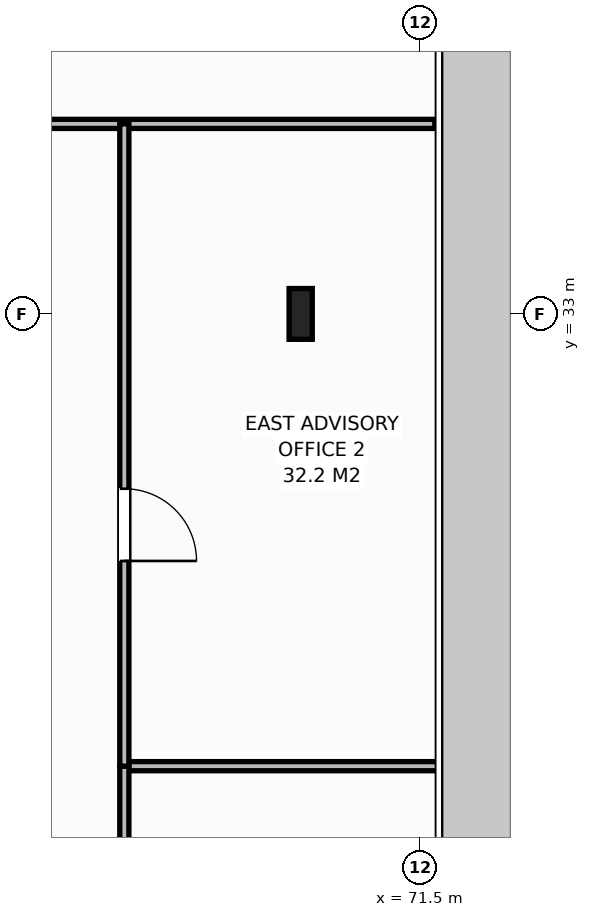
"""IFC4 building model, lengths in metres.
Left out: names, types, materials, properties, quantities, classifications, styles, units other than length and angle.
Written with IfcOpenShell. Run it as: python <this file> out.ifc"""

import sys

from ifc_helpers import new_model, si_unit, direction, frame, frame_2d, origin, origin_2d, place, context, subcontext, project, spatial, rectangle, i_section, extrude, element, fill, save


model = new_model("IFC4")
c1 = context("Model", 3, precision=1e-05, world=origin(), true_north=direction((0.0, 1.0)))
c2 = subcontext(c1, "Body", "Model", "MODEL_VIEW")
j1 = project(units=[si_unit("LENGTHUNIT", "METRE"), si_unit("PLANEANGLEUNIT", "RADIAN")], contexts=[c1])
p1 = place(None, origin())
s1 = spatial("IfcSite", under=j1, at=p1, CompositionType="ELEMENT")
p2 = place(p1, origin())
s2 = spatial("IfcBuilding", under=s1, at=p2, CompositionType="ELEMENT")
p3 = place(p2, frame((0.0, 0.0, 274.6)))
s3 = spatial("IfcBuildingStorey", under=s2, at=p3, CompositionType="ELEMENT", Elevation=274.6)
p4 = place(p3, frame((69.92, 33.0, 0.0), z_axis=(0.0, 0.0, 1.0), x_axis=(1.0, 0.0, 0.0)))
e1 = element("IfcColumn", 1, at=p4, inside=s3, PredefinedType="COLUMN", context=c2, shape_type="SweptSolid", body=[
    extrude(i_section(OverallWidth=0.305, OverallDepth=0.668, WebThickness=0.021, FlangeThickness=0.04, at=origin_2d()), origin(), (0.0, 0.0, 1.0), 3.8),
])
p5 = place(p3, frame((62.016, 35.5, 0.0), z_axis=(0.0, 0.0, 1.0), x_axis=(1.0, 0.0, 0.0)))
e2 = element("IfcWall", 2, at=p5, inside=s3, PredefinedType="PARTITIONING", context=c2, shape_type="SweptSolid", body=[
    extrude(rectangle(XDim=9.669, YDim=0.12, at=frame_2d((4.834, 0.0))), origin(), (0.0, 0.0, 1.0), 3.588),
])
p6 = place(p5, frame((0.48, 0.0, 0.0)))
e3 = element("IfcOpeningElement", 3, at=p6, cuts=e2, PredefinedType="OPENING", context=c2, shape_type="SweptSolid", body=[
    extrude(rectangle(XDim=0.95, YDim=2.15, at=frame_2d((0.475, 1.075))), frame((0.0, 0.07, 0.0), z_axis=(0.0, -1.0, 0.0), x_axis=(1.0, 0.0, 0.0)), (0.0, 0.0, 1.0), 0.14),
])
p7 = place(p3, frame((67.6, 27.05, 0.0), z_axis=(0.0, 0.0, 1.0), x_axis=(1.0, 0.0, 0.0)))
e4 = element("IfcWall", 4, at=p7, inside=s3, PredefinedType="PARTITIONING", context=c2, shape_type="SweptSolid", body=[
    extrude(rectangle(XDim=4.245, YDim=0.12, at=frame_2d((2.123, 0.0))), origin(), (0.0, 0.0, 1.0), 3.588),
])
p8 = place(p3, frame((67.6, 18.6, 0.0), z_axis=(0.0, 0.0, 1.0), x_axis=(0.0, 1.0, 0.0)))
e5 = element("IfcWall", 5, at=p8, inside=s3, PredefinedType="PARTITIONING", context=c2, shape_type="SweptSolid", body=[
    extrude(rectangle(XDim=8.45, YDim=0.12, at=frame_2d((4.225, 0.0))), origin(), (0.0, 0.0, 1.0), 3.588),
])
p9 = place(p8, frame((3.75, 0.0, 0.0)))
e6 = element("IfcOpeningElement", 6, at=p9, cuts=e5, PredefinedType="OPENING", context=c2, shape_type="SweptSolid", body=[
    extrude(rectangle(XDim=0.95, YDim=2.15, at=frame_2d((0.475, 1.075))), frame((0.0, 0.07, 0.0), z_axis=(0.0, -1.0, 0.0), x_axis=(1.0, 0.0, 0.0)), (0.0, 0.0, 1.0), 0.14),
])
p10 = place(p3, frame((67.6, 27.05, 0.0), z_axis=(0.0, 0.0, 1.0), x_axis=(0.0, 1.0, 0.0)))
e7 = element("IfcWall", 7, at=p10, inside=s3, PredefinedType="PARTITIONING", context=c2, shape_type="SweptSolid", body=[
    extrude(rectangle(XDim=8.45, YDim=0.12, at=frame_2d((4.225, 0.0))), origin(), (0.0, 0.0, 1.0), 3.588),
])
p11 = place(p10, frame((2.7, 0.0, 0.0)))
e8 = element("IfcOpeningElement", 8, at=p11, cuts=e7, PredefinedType="OPENING", context=c2, shape_type="SweptSolid", body=[
    extrude(rectangle(XDim=0.95, YDim=2.15, at=frame_2d((0.475, 1.075))), frame((0.0, 0.07, 0.0), z_axis=(0.0, -1.0, 0.0), x_axis=(1.0, 0.0, 0.0)), (0.0, 0.0, 1.0), 0.14),
])
p12 = place(p11, origin())
e9 = element("IfcDoor", 9, at=p12, inside=s3, OperationType="SINGLE_SWING_RIGHT", PredefinedType="DOOR", context=c2, shape_type="SweptSolid", body=[
    extrude(rectangle(XDim=0.95, YDim=2.15, at=frame_2d((0.475, 1.075))), frame((0.0, 0.025, 0.0), z_axis=(0.0, -1.0, 0.0), x_axis=(1.0, 0.0, 0.0)), (0.0, 0.0, 1.0), 0.05),
])
fill(e8, e9)
save(model, sys.argv[1])
